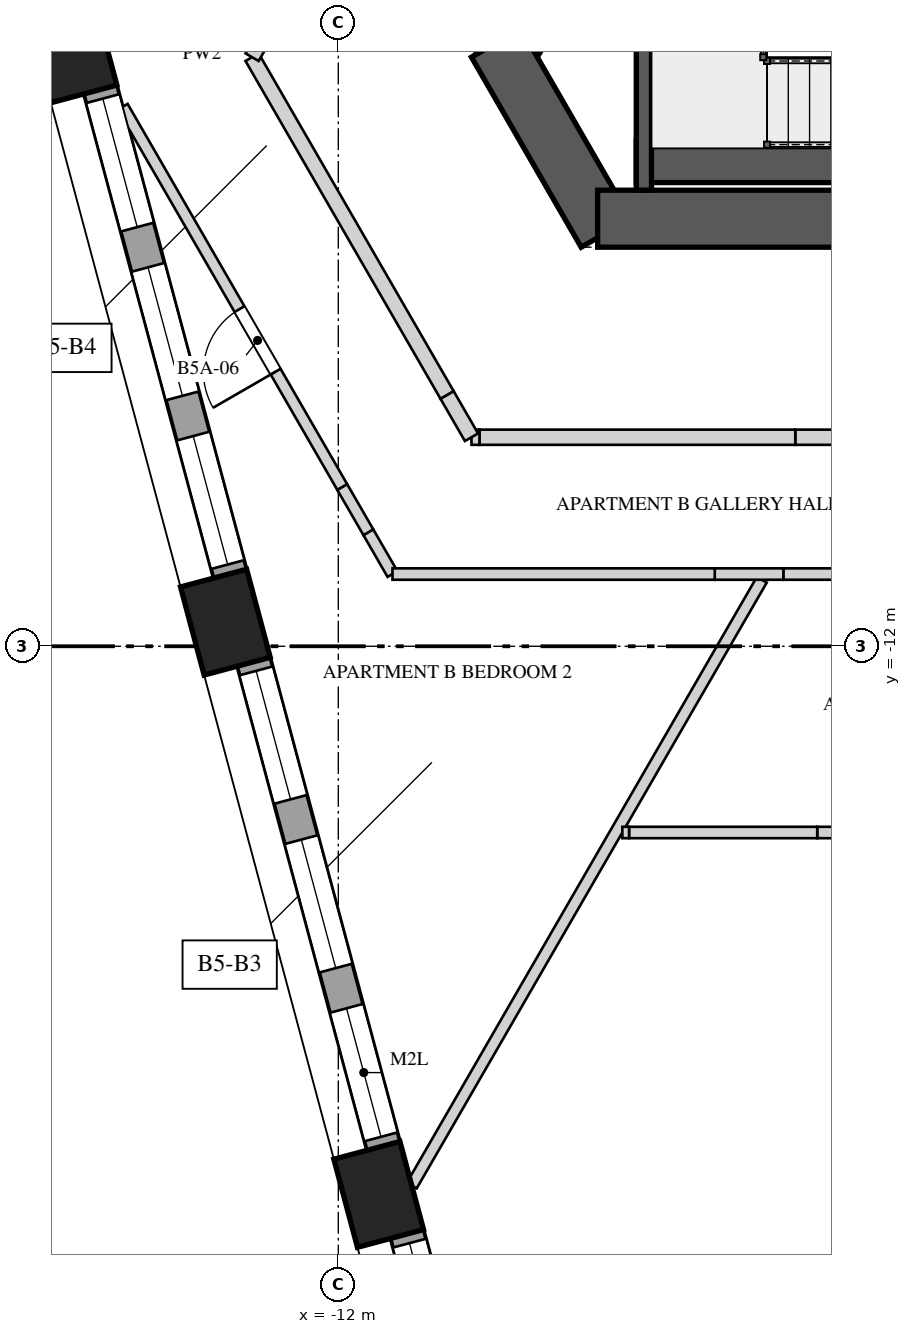
"""IFC4 building model, lengths in metres.
Left out: names, types, materials, properties, quantities, classifications, styles, units other than length and angle.
Written with IfcOpenShell. Run it as: python <this file> out.ifc"""

import sys

from ifc_helpers import new_model, si_unit, direction, frame, frame_2d, origin, origin_2d, place, context, subcontext, project, spatial, polyline, rectangle, outline, extrude, element, fill, save


model = new_model("IFC4")
c1 = context("Model", 3, precision=1e-05, world=origin(), true_north=direction((0.0, 1.0)))
c2 = subcontext(c1, "Body", "Model", "MODEL_VIEW")
j1 = project(units=[si_unit("LENGTHUNIT", "METRE"), si_unit("PLANEANGLEUNIT", "RADIAN")], contexts=[c1])
p1 = place(None, origin())
s1 = spatial("IfcSite", under=j1, at=p1, CompositionType="ELEMENT")
p2 = place(p1, origin())
s2 = spatial("IfcBuilding", under=s1, at=p2, CompositionType="ELEMENT")
p3 = place(p2, frame((0.0, 0.0, 200.0)))
s3 = spatial("IfcBuildingStorey", under=s2, at=p3, CompositionType="ELEMENT", Elevation=200.0)
p4 = place(p3, frame((-1.227, 10.625, 0.0), z_axis=(0.0, 0.0, 1.0), x_axis=(-0.500002161919, -0.866024155596, 0.0)))
e1 = element("IfcWall", 1, at=p4, inside=s3, PredefinedType="SHEAR", context=c2, shape_type="SweptSolid", body=[
    extrude(rectangle(XDim=17.176, YDim=0.75, at=frame_2d((8.588, 0.0))), origin(), (0.0, 0.0, 1.0), 4.0),
])
p5 = place(p4, frame((6.793, 0.0, 0.0)))
e2 = element("IfcOpeningElement", 2, at=p5, cuts=e1, PredefinedType="OPENING", context=c2, shape_type="SweptSolid", body=[
    extrude(rectangle(XDim=1.0, YDim=2.4, at=frame_2d((0.5, 1.2))), frame((0.0, 0.385, 0.0), z_axis=(0.0, -1.0, 0.0), x_axis=(1.0, 0.0, 0.0)), (0.0, 0.0, 1.0), 0.77),
])
p6 = place(p4, frame((14.864, 0.0, 0.0)))
e3 = element("IfcOpeningElement", 3, at=p6, cuts=e1, PredefinedType="OPENING", context=c2, shape_type="SweptSolid", body=[
    extrude(rectangle(XDim=0.8, YDim=2.1, at=frame_2d((0.4, 1.05))), frame((0.0, 0.385, 0.0), z_axis=(0.0, -1.0, 0.0), x_axis=(1.0, 0.0, 0.0)), (0.0, 0.0, 1.0), 0.77),
])
p7 = place(p3, frame((-9.923, -4.062, 0.0), z_axis=(0.0, 0.0, 1.0), x_axis=(0.499995765644, -0.866027848477, 0.0)))
e4 = element("IfcWall", 4, at=p7, inside=s3, PredefinedType="SHEAR", context=c2, shape_type="SweptSolid", body=[
    extrude(rectangle(XDim=2.887, YDim=0.75, at=frame_2d((1.443, 0.0))), origin(), (0.0, 0.0, 1.0), 4.0),
])
p8 = place(p3, frame((-8.588, -6.375, 0.0), z_axis=(0.0, 0.0, 1.0), x_axis=(1.0, 0.0, 0.0)))
e5 = element("IfcWall", 5, at=p8, inside=s3, PredefinedType="SHEAR", context=c2, shape_type="SweptSolid", body=[
    extrude(rectangle(XDim=17.176, YDim=0.75, at=frame_2d((8.588, 0.0))), origin(), (0.0, 0.0, 1.0), 4.0),
])
p9 = place(p8, frame((6.793, 0.0, 0.0)))
e6 = element("IfcOpeningElement", 6, at=p9, cuts=e5, PredefinedType="OPENING", context=c2, shape_type="SweptSolid", body=[
    extrude(rectangle(XDim=1.0, YDim=2.4, at=frame_2d((0.5, 1.2))), frame((0.0, 0.385, 0.0), z_axis=(0.0, -1.0, 0.0), x_axis=(1.0, 0.0, 0.0)), (0.0, 0.0, 1.0), 0.77),
])
for number, where, z_axis, x_axis in (
    (7, (-15.503, -4.154, -0.35), (0.0, 0.0, 1.0), (0.259, -0.966, 0.0)),
    (8, (-13.486, -11.683, -0.35), (0.0, 0.0, 1.0), (0.259, -0.966, 0.0)),
    (9, (-11.469, -19.211, -0.35), (0.0, 0.0, 1.0), (0.259, -0.966, 0.0)),
):
    element("IfcColumn", number, at=place(p3, frame(where, z_axis=z_axis, x_axis=x_axis)), inside=s3, PredefinedType="COLUMN", context=c2, shape_type="SweptSolid", body=[
        extrude(rectangle(XDim=1.2, YDim=0.9, at=origin_2d()), origin(), (0.0, 0.0, 1.0), 4.35),
    ])
p10 = place(p3, frame((-15.13, -4.675, 0.0), z_axis=(0.0, 0.0, 1.0), x_axis=(0.258791602952, -0.965933178973, 0.0)))
e10 = element("IfcWall", 10, at=p10, inside=s3, PredefinedType="SOLIDWALL", context=c2, shape_type="SweptSolid", body=[
    extrude(rectangle(XDim=6.594, YDim=0.45, at=frame_2d((3.297, 0.0))), origin(), (0.0, 0.0, 1.0), 3.3),
])
p11 = place(p10, frame((0.124, 0.0, 0.5)))
e11 = element("IfcOpeningElement", 11, at=p11, cuts=e10, PredefinedType="OPENING", context=c2, shape_type="SweptSolid", body=[
    extrude(rectangle(XDim=1.75, YDim=2.65, at=frame_2d((0.875, 1.325))), frame((0.0, 0.235, 0.0), z_axis=(0.0, -1.0, 0.0), x_axis=(1.0, 0.0, 0.0)), (0.0, 0.0, 1.0), 0.47),
])
p12 = place(p10, frame((2.422, 0.0, 0.5)))
e12 = element("IfcOpeningElement", 12, at=p12, cuts=e10, PredefinedType="OPENING", context=c2, shape_type="SweptSolid", body=[
    extrude(rectangle(XDim=1.75, YDim=2.65, at=frame_2d((0.875, 1.325))), frame((0.0, 0.235, 0.0), z_axis=(0.0, -1.0, 0.0), x_axis=(1.0, 0.0, 0.0)), (0.0, 0.0, 1.0), 0.47),
])
p13 = place(p10, frame((4.72, 0.0, 0.5)))
e13 = element("IfcOpeningElement", 13, at=p13, cuts=e10, PredefinedType="OPENING", context=c2, shape_type="SweptSolid", body=[
    extrude(rectangle(XDim=1.75, YDim=2.65, at=frame_2d((0.875, 1.325))), frame((0.0, 0.235, 0.0), z_axis=(0.0, -1.0, 0.0), x_axis=(1.0, 0.0, 0.0)), (0.0, 0.0, 1.0), 0.47),
])
p14 = place(p3, frame((-13.113, -12.204, 0.0), z_axis=(0.0, 0.0, 1.0), x_axis=(0.258835402268, -0.965921443251, 0.0)))
e14 = element("IfcWall", 14, at=p14, inside=s3, PredefinedType="SOLIDWALL", context=c2, shape_type="SweptSolid", body=[
    extrude(rectangle(XDim=6.594, YDim=0.45, at=frame_2d((3.297, 0.0))), origin(), (0.0, 0.0, 1.0), 3.3),
])
p15 = place(p14, frame((0.124, 0.0, 0.5)))
e15 = element("IfcOpeningElement", 15, at=p15, cuts=e14, PredefinedType="OPENING", context=c2, shape_type="SweptSolid", body=[
    extrude(rectangle(XDim=1.75, YDim=2.65, at=frame_2d((0.875, 1.325))), frame((0.0, 0.235, 0.0), z_axis=(0.0, -1.0, 0.0), x_axis=(1.0, 0.0, 0.0)), (0.0, 0.0, 1.0), 0.47),
])
p16 = place(p14, frame((2.422, 0.0, 0.5)))
e16 = element("IfcOpeningElement", 16, at=p16, cuts=e14, PredefinedType="OPENING", context=c2, shape_type="SweptSolid", body=[
    extrude(rectangle(XDim=1.75, YDim=2.65, at=frame_2d((0.875, 1.325))), frame((0.0, 0.235, 0.0), z_axis=(0.0, -1.0, 0.0), x_axis=(1.0, 0.0, 0.0)), (0.0, 0.0, 1.0), 0.47),
])
p17 = place(p14, frame((4.72, 0.0, 0.5)))
e17 = element("IfcOpeningElement", 17, at=p17, cuts=e14, PredefinedType="OPENING", context=c2, shape_type="SweptSolid", body=[
    extrude(rectangle(XDim=1.75, YDim=2.0, at=frame_2d((0.875, 1.0))), frame((0.0, 0.235, 0.0), z_axis=(0.0, -1.0, 0.0), x_axis=(1.0, 0.0, 0.0)), (0.0, 0.0, 1.0), 0.47),
])
p18 = place(p3, frame((-11.096, -19.733, 0.0), z_axis=(0.0, 0.0, 1.0), x_axis=(0.258831089404, -0.965922598948, 0.0)))
e18 = element("IfcWall", 18, at=p18, inside=s3, PredefinedType="SOLIDWALL", context=c2, shape_type="SweptSolid", body=[
    extrude(rectangle(XDim=5.994, YDim=0.45, at=frame_2d((2.997, 0.0))), origin(), (0.0, 0.0, 1.0), 3.3),
])
p19 = place(p18, frame((0.124, 0.0, 0.5)))
e19 = element("IfcOpeningElement", 19, at=p19, cuts=e18, PredefinedType="OPENING", context=c2, shape_type="SweptSolid", body=[
    extrude(rectangle(XDim=1.75, YDim=2.65, at=frame_2d((0.875, 1.325))), frame((0.0, 0.235, 0.0), z_axis=(0.0, -1.0, 0.0), x_axis=(1.0, 0.0, 0.0)), (0.0, 0.0, 1.0), 0.47),
])
p20 = place(p18, frame((2.422, 0.0, 0.5)))
e20 = element("IfcOpeningElement", 20, at=p20, cuts=e18, PredefinedType="OPENING", context=c2, shape_type="SweptSolid", body=[
    extrude(rectangle(XDim=1.75, YDim=2.65, at=frame_2d((0.875, 1.325))), frame((0.0, 0.235, 0.0), z_axis=(0.0, -1.0, 0.0), x_axis=(1.0, 0.0, 0.0)), (0.0, 0.0, 1.0), 0.47),
])
p21 = place(p18, frame((4.745, 0.0, 0.5)))
e21 = element("IfcOpeningElement", 21, at=p21, cuts=e18, PredefinedType="OPENING", context=c2, shape_type="SweptSolid", body=[
    extrude(rectangle(XDim=1.1, YDim=2.0, at=frame_2d((0.55, 1.0))), frame((0.0, 0.235, 0.0), z_axis=(0.0, -1.0, 0.0), x_axis=(1.0, 0.0, 0.0)), (0.0, 0.0, 1.0), 0.47),
])
p22 = place(p3, frame((-8.08, -5.625, 0.0), z_axis=(0.0, 0.0, 1.0), x_axis=(1.0, 0.0, 0.0)))
e22 = element("IfcWall", 22, at=p22, inside=s3, PredefinedType="SOLIDWALL", context=c2, shape_type="SweptSolid", body=[
    extrude(rectangle(XDim=6.2, YDim=0.55, at=frame_2d((3.1, 0.0))), origin(), (0.0, 0.0, 1.0), 3.65),
])
p23 = place(p3, frame((-7.98, -2.9, 0.0), z_axis=(0.0, 0.0, 1.0), x_axis=(0.0, -1.0, 0.0)))
e23 = element("IfcWall", 23, at=p23, inside=s3, PredefinedType="SOLIDWALL", context=c2, shape_type="SweptSolid", body=[
    extrude(rectangle(XDim=3.1, YDim=0.2, at=frame_2d((1.55, 0.0))), origin(), (0.0, 0.0, 1.0), 3.65),
])
p24 = place(p3, frame((-11.287, -11.05, 0.0), z_axis=(0.0, 0.0, 1.0), x_axis=(-0.500187988959, 0.865916841101, 0.0)))
e24 = element("IfcWall", 24, at=p24, inside=s3, PredefinedType="PARTITIONING", context=c2, shape_type="SweptSolid", body=[
    extrude(rectangle(XDim=0.635, YDim=0.15, at=frame_2d((0.318, 0.0))), origin(), (0.0, 0.0, 1.0), 3.65),
])
p25 = place(p3, frame((-11.605, -10.5, 0.0), z_axis=(0.0, 0.0, 1.0), x_axis=(-0.499845467243, 0.866114604932, 0.0)))
e25 = element("IfcWall", 25, at=p25, inside=s3, PredefinedType="PARTITIONING", context=c2, shape_type="SweptSolid", body=[
    extrude(rectangle(XDim=0.687, YDim=0.15, at=frame_2d((0.344, 0.0))), origin(), (0.0, 0.0, 1.0), 2.95),
])
p26 = place(p3, frame((-11.948, -9.905, 0.0), z_axis=(0.0, 0.0, 1.0), x_axis=(-0.500016344183, 0.86601596726, 0.0)))
e26 = element("IfcWall", 26, at=p26, inside=s3, PredefinedType="PARTITIONING", context=c2, shape_type="SweptSolid", body=[
    extrude(rectangle(XDim=5.777, YDim=0.15, at=frame_2d((2.888, 0.0))), origin(), (0.0, 0.0, 1.0), 3.65),
])
p27 = place(p26, frame((1.752, 0.0, 0.0)))
e27 = element("IfcOpeningElement", 27, at=p27, cuts=e26, PredefinedType="OPENING", context=c2, shape_type="SweptSolid", body=[
    extrude(rectangle(XDim=0.95, YDim=2.4, at=frame_2d((0.475, 1.2))), frame((0.0, 0.085, 0.0), z_axis=(0.0, -1.0, 0.0), x_axis=(1.0, 0.0, 0.0)), (0.0, 0.0, 1.0), 0.17),
])
p28 = place(p3, frame((-11.034, -19.095, 0.0), z_axis=(0.0, 0.0, 1.0), x_axis=(0.500337694151, 0.86583034817, 0.0)))
e28 = element("IfcWall", 28, at=p28, inside=s3, PredefinedType="PARTITIONING", context=c2, shape_type="SweptSolid", body=[
    extrude(rectangle(XDim=9.205, YDim=0.15, at=frame_2d((4.603, 0.0))), origin(), (0.0, 0.0, 1.0), 2.75),
])
p29 = place(p3, frame((-4.193, -14.45, 0.0), z_axis=(0.0, 0.0, 1.0), x_axis=(-1.0, 0.0, 0.0)))
e29 = element("IfcWall", 29, at=p29, inside=s3, PredefinedType="PARTITIONING", context=c2, shape_type="SweptSolid", body=[
    extrude(outline(polyline([(0.0, 0.0), (1.506, 0.0), (1.506, 2.55), (0.575, 2.55), (0.575, 3.65), (0.0, 3.65), (0.0, 0.0)])), frame((0.0, 0.075, 0.0), z_axis=(0.0, -1.0, 0.0), x_axis=(1.0, 0.0, 0.0)), (0.0, 0.0, 1.0), 0.15),
])
p30 = place(p29, frame((0.05, 0.0, 0.0)))
e30 = element("IfcOpeningElement", 30, at=p30, cuts=e29, PredefinedType="OPENING", context=c2, shape_type="SweptSolid", body=[
    extrude(rectangle(XDim=0.95, YDim=2.4, at=frame_2d((0.475, 1.2))), frame((0.0, 0.085, 0.0), z_axis=(0.0, -1.0, 0.0), x_axis=(1.0, 0.0, 0.0)), (0.0, 0.0, 1.0), 0.17),
])
p31 = place(p3, frame((-5.699, -14.45, 0.0), z_axis=(0.0, 0.0, 1.0), x_axis=(-1.0, 0.0, 0.0)))
e31 = element("IfcWall", 31, at=p31, inside=s3, PredefinedType="PARTITIONING", context=c2, shape_type="SweptSolid", body=[
    extrude(rectangle(XDim=2.476, YDim=0.15, at=frame_2d((1.238, 0.0))), origin(), (0.0, 0.0, 1.0), 3.65),
])
p32 = place(p3, frame((-8.175, -14.45, 0.0), z_axis=(0.0, 0.0, 1.0), x_axis=(-1.0, 0.0, 0.0)))
e32 = element("IfcWall", 32, at=p32, inside=s3, PredefinedType="PARTITIONING", context=c2, shape_type="SweptSolid", body=[
    extrude(rectangle(XDim=0.088, YDim=0.15, at=frame_2d((0.044, 0.0))), origin(), (0.0, 0.0, 1.0), 2.75),
])
p33 = place(p3, frame((-4.468, -11.05, 0.0), z_axis=(0.0, 0.0, 1.0), x_axis=(-1.0, 0.0, 0.0)))
e33 = element("IfcWall", 33, at=p33, inside=s3, PredefinedType="PARTITIONING", context=c2, shape_type="SweptSolid", body=[
    extrude(rectangle(XDim=1.677, YDim=0.15, at=frame_2d((0.839, 0.0))), origin(), (0.0, 0.0, 1.0), 3.65),
])
p34 = place(p3, frame((-6.145, -11.05, 0.0), z_axis=(0.0, 0.0, 1.0), x_axis=(-1.0, 0.0, 0.0)))
e34 = element("IfcWall", 34, at=p34, inside=s3, PredefinedType="PARTITIONING", context=c2, shape_type="SweptSolid", body=[
    extrude(rectangle(XDim=0.903, YDim=0.15, at=frame_2d((0.451, 0.0))), origin(), (0.0, 0.0, 1.0), 2.75),
])
p35 = place(p3, frame((-7.048, -11.05, 0.0), z_axis=(0.0, 0.0, 1.0), x_axis=(-1.0, 0.0, 0.0)))
e35 = element("IfcWall", 35, at=p35, inside=s3, PredefinedType="PARTITIONING", context=c2, shape_type="SweptSolid", body=[
    extrude(rectangle(XDim=4.239, YDim=0.15, at=frame_2d((2.12, 0.0))), origin(), (0.0, 0.0, 1.0), 3.65),
])
p36 = place(p3, frame((-5.056, -9.25, 0.0), z_axis=(0.0, 0.0, 1.0), x_axis=(-1.0, 0.0, 0.0)))
e36 = element("IfcWall", 36, at=p36, inside=s3, PredefinedType="SOLIDWALL", context=c2, shape_type="SweptSolid", body=[
    extrude(rectangle(XDim=0.932, YDim=0.2, at=frame_2d((0.466, 0.0))), origin(), (0.0, 0.0, 1.0), 2.75),
])
p37 = place(p3, frame((-5.988, -9.25, 0.0), z_axis=(0.0, 0.0, 1.0), x_axis=(-1.0, 0.0, 0.0)))
e37 = element("IfcWall", 37, at=p37, inside=s3, PredefinedType="SOLIDWALL", context=c2, shape_type="SweptSolid", body=[
    extrude(rectangle(XDim=4.155, YDim=0.2, at=frame_2d((2.078, 0.0))), origin(), (0.0, 0.0, 1.0), 3.65),
])
p38 = place(p3, frame((-10.143, -9.25, 0.0), z_axis=(0.0, 0.0, 1.0), x_axis=(-1.0, 0.0, 0.0)))
e38 = element("IfcWall", 38, at=p38, inside=s3, PredefinedType="SOLIDWALL", context=c2, shape_type="SweptSolid", body=[
    extrude(rectangle(XDim=0.105, YDim=0.2, at=frame_2d((0.052, 0.0))), origin(), (0.0, 0.0, 1.0), 2.95),
])
p39 = place(p3, frame((-10.248, -9.25, 0.0), z_axis=(0.0, 0.0, 1.0), x_axis=(-0.499733411443, 0.86617926406, 0.0)))
e39 = element("IfcWall", 39, at=p39, inside=s3, PredefinedType="SOLIDWALL", context=c2, shape_type="SweptSolid", body=[
    extrude(rectangle(XDim=0.643, YDim=0.2, at=frame_2d((0.321, 0.0))), origin(), (0.0, 0.0, 1.0), 2.95),
])
p40 = place(p3, frame((-10.569, -8.693, 0.0), z_axis=(0.0, 0.0, 1.0), x_axis=(-0.500028638513, 0.8660088687, 0.0)))
e40 = element("IfcWall", 40, at=p40, inside=s3, PredefinedType="SOLIDWALL", context=c2, shape_type="SweptSolid", body=[
    extrude(rectangle(XDim=5.131, YDim=0.2, at=frame_2d((2.565, 0.0))), origin(), (0.0, 0.0, 1.0), 3.65),
])
p41 = place(p3, frame((-13.135, -4.25, 0.0), z_axis=(0.0, 0.0, 1.0), x_axis=(0.500002592159, 0.866023907196, 0.0)))
e41 = element("IfcWall", 41, at=p41, inside=s3, PredefinedType="SOLIDWALL", context=c2, shape_type="SweptSolid", body=[
    extrude(rectangle(XDim=0.503, YDim=0.2, at=frame_2d((0.251, 0.0))), origin(), (0.0, 0.0, 1.0), 3.65),
])
p42 = place(p11, origin())
e42 = element("IfcWindow", 42, at=p42, inside=s3, PartitioningType="SINGLE_PANEL", PredefinedType="WINDOW", context=c2, shape_type="SweptSolid", body=[
    extrude(rectangle(XDim=1.75, YDim=2.65, at=frame_2d((0.875, 1.325))), frame((0.0, 0.03, 0.0), z_axis=(0.0, -1.0, 0.0), x_axis=(1.0, 0.0, 0.0)), (0.0, 0.0, 1.0), 0.06),
])
fill(e11, e42)
p43 = place(p12, origin())
e43 = element("IfcWindow", 43, at=p43, inside=s3, PartitioningType="SINGLE_PANEL", PredefinedType="WINDOW", context=c2, shape_type="SweptSolid", body=[
    extrude(rectangle(XDim=1.75, YDim=2.65, at=frame_2d((0.875, 1.325))), frame((0.0, 0.03, 0.0), z_axis=(0.0, -1.0, 0.0), x_axis=(1.0, 0.0, 0.0)), (0.0, 0.0, 1.0), 0.06),
])
fill(e12, e43)
p44 = place(p13, origin())
e44 = element("IfcWindow", 44, at=p44, inside=s3, PartitioningType="SINGLE_PANEL", PredefinedType="WINDOW", context=c2, shape_type="SweptSolid", body=[
    extrude(rectangle(XDim=1.75, YDim=2.65, at=frame_2d((0.875, 1.325))), frame((0.0, 0.03, 0.0), z_axis=(0.0, -1.0, 0.0), x_axis=(1.0, 0.0, 0.0)), (0.0, 0.0, 1.0), 0.06),
])
fill(e13, e44)
p45 = place(p15, origin())
e45 = element("IfcWindow", 45, at=p45, inside=s3, PartitioningType="SINGLE_PANEL", PredefinedType="WINDOW", context=c2, shape_type="SweptSolid", body=[
    extrude(rectangle(XDim=1.75, YDim=2.65, at=frame_2d((0.875, 1.325))), frame((0.0, 0.03, 0.0), z_axis=(0.0, -1.0, 0.0), x_axis=(1.0, 0.0, 0.0)), (0.0, 0.0, 1.0), 0.06),
])
fill(e15, e45)
p46 = place(p16, origin())
e46 = element("IfcWindow", 46, at=p46, inside=s3, PartitioningType="SINGLE_PANEL", PredefinedType="WINDOW", context=c2, shape_type="SweptSolid", body=[
    extrude(rectangle(XDim=1.75, YDim=2.65, at=frame_2d((0.875, 1.325))), frame((0.0, 0.03, 0.0), z_axis=(0.0, -1.0, 0.0), x_axis=(1.0, 0.0, 0.0)), (0.0, 0.0, 1.0), 0.06),
])
fill(e16, e46)
p47 = place(p17, origin())
e47 = element("IfcWindow", 47, at=p47, inside=s3, PartitioningType="SINGLE_PANEL", PredefinedType="WINDOW", context=c2, shape_type="SweptSolid", body=[
    extrude(rectangle(XDim=1.75, YDim=2.0, at=frame_2d((0.875, 1.0))), frame((0.0, 0.03, 0.0), z_axis=(0.0, -1.0, 0.0), x_axis=(1.0, 0.0, 0.0)), (0.0, 0.0, 1.0), 0.06),
])
fill(e17, e47)
p48 = place(p19, origin())
e48 = element("IfcWindow", 48, at=p48, inside=s3, PartitioningType="SINGLE_PANEL", PredefinedType="WINDOW", context=c2, shape_type="SweptSolid", body=[
    extrude(rectangle(XDim=1.75, YDim=2.65, at=frame_2d((0.875, 1.325))), frame((0.0, 0.03, 0.0), z_axis=(0.0, -1.0, 0.0), x_axis=(1.0, 0.0, 0.0)), (0.0, 0.0, 1.0), 0.06),
])
fill(e19, e48)
p49 = place(p27, origin())
e49 = element("IfcDoor", 49, at=p49, inside=s3, OperationType="SINGLE_SWING_RIGHT", PredefinedType="DOOR", context=c2, shape_type="SweptSolid", body=[
    extrude(rectangle(XDim=0.95, YDim=2.4, at=frame_2d((0.475, 1.2))), frame((0.0, 0.025, 0.0), z_axis=(0.0, -1.0, 0.0), x_axis=(1.0, 0.0, 0.0)), (0.0, 0.0, 1.0), 0.05),
])
fill(e27, e49)
save(model, sys.argv[1])
